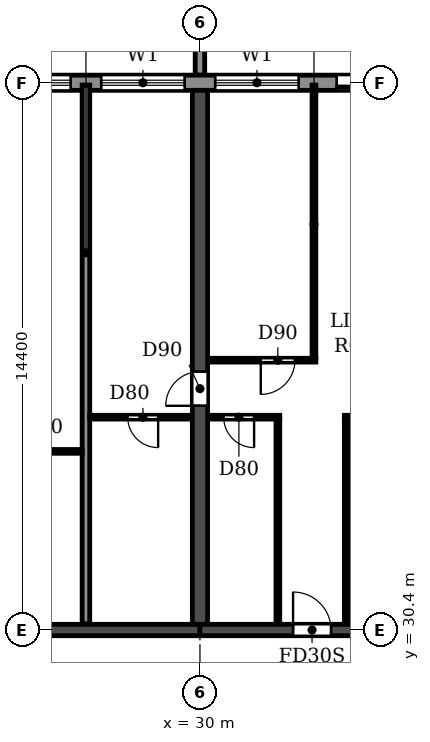
"""IFC4 building model, lengths in metres.
Left out: names, types, materials, properties, quantities, classifications, styles, units other than length and angle.
Written with IfcOpenShell. Run it as: python <this file> out.ifc"""

import sys

from ifc_helpers import new_model, si_unit, direction, frame, frame_2d, origin, place, context, subcontext, project, spatial, polyline, rectangle, outline, extrude, source, transform, mapped, element, fill, save


model = new_model("IFC4")
c1 = context("Model", 3, precision=1e-05, world=origin(), true_north=direction((0.0, 1.0)))
c2 = subcontext(c1, "Body", "Model", "MODEL_VIEW")
j1 = project(units=[si_unit("LENGTHUNIT", "METRE"), si_unit("PLANEANGLEUNIT", "RADIAN")], contexts=[c1])
p1 = place(None, origin())
s1 = spatial("IfcSite", under=j1, at=p1, CompositionType="ELEMENT")
p2 = place(p1, origin())
s2 = spatial("IfcBuilding", under=s1, at=p2, CompositionType="ELEMENT")
p3 = place(p2, frame((0.0, 0.0, 49.8)))
s3 = spatial("IfcBuildingStorey", under=s2, at=p3, CompositionType="ELEMENT", Elevation=49.8)
p4 = place(p3, frame((30.0, 30.55, 0.0), z_axis=(0.0, 0.0, 1.0), x_axis=(0.0, 1.0, 0.0)))
e1 = element("IfcWall", 1, at=p4, inside=s3, PredefinedType="SHEAR", context=c2, shape_type="SweptSolid", body=[
    extrude(rectangle(XDim=14.05, YDim=0.4, at=frame_2d((7.025, 0.0))), origin(), (0.0, 0.0, 1.0), 3.0),
])
p5 = place(p4, frame((5.75, 0.0, 0.0)))
e2 = element("IfcOpeningElement", 2, at=p5, cuts=e1, PredefinedType="OPENING", context=c2, shape_type="SweptSolid", body=[
    extrude(rectangle(XDim=0.9, YDim=2.1, at=frame_2d((0.45, 1.05))), frame((0.0, 0.21, 0.0), z_axis=(0.0, -1.0, 0.0), x_axis=(1.0, 0.0, 0.0)), (0.0, 0.0, 1.0), 0.42),
])
p6 = place(p3, frame((24.0, 30.4, 0.0), z_axis=(0.0, 0.0, 1.0), x_axis=(1.0, 0.0, 0.0)))
e3 = element("IfcWall", 3, at=p6, inside=s3, PredefinedType="SHEAR", context=c2, shape_type="SweptSolid", body=[
    extrude(rectangle(XDim=6.0, YDim=0.3, at=frame_2d((3.0, 0.0))), origin(), (0.0, 0.0, 1.0), 2.4),
])
p7 = place(p3, frame((30.0, 30.4, 0.0), z_axis=(0.0, 0.0, 1.0), x_axis=(1.0, 0.0, 0.0)))
e4 = element("IfcWall", 4, at=p7, inside=s3, PredefinedType="SHEAR", context=c2, shape_type="SweptSolid", body=[
    extrude(rectangle(XDim=6.0, YDim=0.3, at=frame_2d((3.0, 0.0))), origin(), (0.0, 0.0, 1.0), 2.4),
])
p8 = place(p7, frame((2.45, 0.0, 0.0)))
e5 = element("IfcOpeningElement", 5, at=p8, cuts=e4, PredefinedType="OPENING", context=c2, shape_type="SweptSolid", body=[
    extrude(rectangle(XDim=1.0, YDim=2.1, at=frame_2d((0.5, 1.05))), frame((0.0, 0.16, 0.0), z_axis=(0.0, -1.0, 0.0), x_axis=(1.0, 0.0, 0.0)), (0.0, 0.0, 1.0), 0.32),
])
p9 = place(p3, frame((97.317, 44.8, 0.0), z_axis=(0.0, 0.0, 1.0), x_axis=(-1.0, 0.0, 0.0)))
e6 = element("IfcWall", 6, at=p9, inside=s3, PredefinedType="STANDARD", context=c2, shape_type="SweptSolid", body=[
    extrude(rectangle(XDim=92.634, YDim=0.4, at=frame_2d((46.317, 0.0))), origin(), (0.0, 0.0, 1.0), 3.0),
])
p10 = place(p9, frame((88.917, 0.0, 0.0)))
e7 = element("IfcOpeningElement", 7, at=p10, cuts=e6, PredefinedType="OPENING", context=c2, shape_type="SweptSolid", body=[
    extrude(rectangle(XDim=1.8, YDim=2.4, at=frame_2d((0.9, 1.2))), frame((0.0, 0.21, 0.0), z_axis=(0.0, -1.0, 0.0), x_axis=(1.0, 0.0, 0.0)), (0.0, 0.0, 1.0), 0.42),
])
p11 = place(p9, frame((85.717, 0.0, 0.9)))
e8 = element("IfcOpeningElement", 8, at=p11, cuts=e6, PredefinedType="OPENING", context=c2, shape_type="SweptSolid", body=[
    extrude(rectangle(XDim=2.2, YDim=1.5, at=frame_2d((1.1, 0.75))), frame((0.0, 0.21, 0.0), z_axis=(0.0, -1.0, 0.0), x_axis=(1.0, 0.0, 0.0)), (0.0, 0.0, 1.0), 0.42),
])
p12 = place(p9, frame((82.717, 0.0, 0.9)))
e9 = element("IfcOpeningElement", 9, at=p12, cuts=e6, PredefinedType="OPENING", context=c2, shape_type="SweptSolid", body=[
    extrude(rectangle(XDim=2.2, YDim=1.5, at=frame_2d((1.1, 0.75))), frame((0.0, 0.21, 0.0), z_axis=(0.0, -1.0, 0.0), x_axis=(1.0, 0.0, 0.0)), (0.0, 0.0, 1.0), 0.42),
])
p13 = place(p9, frame((79.717, 0.0, 0.9)))
e10 = element("IfcOpeningElement", 10, at=p13, cuts=e6, PredefinedType="OPENING", context=c2, shape_type="SweptSolid", body=[
    extrude(rectangle(XDim=2.2, YDim=1.5, at=frame_2d((1.1, 0.75))), frame((0.0, 0.21, 0.0), z_axis=(0.0, -1.0, 0.0), x_axis=(1.0, 0.0, 0.0)), (0.0, 0.0, 1.0), 0.42),
])
p14 = place(p9, frame((76.717, 0.0, 0.9)))
e11 = element("IfcOpeningElement", 11, at=p14, cuts=e6, PredefinedType="OPENING", context=c2, shape_type="SweptSolid", body=[
    extrude(rectangle(XDim=2.2, YDim=1.5, at=frame_2d((1.1, 0.75))), frame((0.0, 0.21, 0.0), z_axis=(0.0, -1.0, 0.0), x_axis=(1.0, 0.0, 0.0)), (0.0, 0.0, 1.0), 0.42),
])
p15 = place(p9, frame((73.917, 0.0, 0.0)))
e12 = element("IfcOpeningElement", 12, at=p15, cuts=e6, PredefinedType="OPENING", context=c2, shape_type="SweptSolid", body=[
    extrude(rectangle(XDim=1.8, YDim=2.4, at=frame_2d((0.9, 1.2))), frame((0.0, 0.21, 0.0), z_axis=(0.0, -1.0, 0.0), x_axis=(1.0, 0.0, 0.0)), (0.0, 0.0, 1.0), 0.42),
])
p16 = place(p9, frame((70.717, 0.0, 0.9)))
e13 = element("IfcOpeningElement", 13, at=p16, cuts=e6, PredefinedType="OPENING", context=c2, shape_type="SweptSolid", body=[
    extrude(rectangle(XDim=2.2, YDim=1.5, at=frame_2d((1.1, 0.75))), frame((0.0, 0.21, 0.0), z_axis=(0.0, -1.0, 0.0), x_axis=(1.0, 0.0, 0.0)), (0.0, 0.0, 1.0), 0.42),
])
p17 = place(p9, frame((67.717, 0.0, 0.9)))
e14 = element("IfcOpeningElement", 14, at=p17, cuts=e6, PredefinedType="OPENING", context=c2, shape_type="SweptSolid", body=[
    extrude(rectangle(XDim=2.2, YDim=1.5, at=frame_2d((1.1, 0.75))), frame((0.0, 0.21, 0.0), z_axis=(0.0, -1.0, 0.0), x_axis=(1.0, 0.0, 0.0)), (0.0, 0.0, 1.0), 0.42),
])
p18 = place(p9, frame((64.717, 0.0, 0.9)))
e15 = element("IfcOpeningElement", 15, at=p18, cuts=e6, PredefinedType="OPENING", context=c2, shape_type="SweptSolid", body=[
    extrude(rectangle(XDim=2.2, YDim=1.5, at=frame_2d((1.1, 0.75))), frame((0.0, 0.21, 0.0), z_axis=(0.0, -1.0, 0.0), x_axis=(1.0, 0.0, 0.0)), (0.0, 0.0, 1.0), 0.42),
])
p19 = place(p9, frame((61.917, 0.0, 0.0)))
e16 = element("IfcOpeningElement", 16, at=p19, cuts=e6, PredefinedType="OPENING", context=c2, shape_type="SweptSolid", body=[
    extrude(rectangle(XDim=1.8, YDim=2.4, at=frame_2d((0.9, 1.2))), frame((0.0, 0.21, 0.0), z_axis=(0.0, -1.0, 0.0), x_axis=(1.0, 0.0, 0.0)), (0.0, 0.0, 1.0), 0.42),
])
p20 = place(p9, frame((58.717, 0.0, 0.9)))
e17 = element("IfcOpeningElement", 17, at=p20, cuts=e6, PredefinedType="OPENING", context=c2, shape_type="SweptSolid", body=[
    extrude(rectangle(XDim=2.2, YDim=1.5, at=frame_2d((1.1, 0.75))), frame((0.0, 0.21, 0.0), z_axis=(0.0, -1.0, 0.0), x_axis=(1.0, 0.0, 0.0)), (0.0, 0.0, 1.0), 0.42),
])
p21 = place(p9, frame((55.717, 0.0, 0.9)))
e18 = element("IfcOpeningElement", 18, at=p21, cuts=e6, PredefinedType="OPENING", context=c2, shape_type="SweptSolid", body=[
    extrude(rectangle(XDim=2.2, YDim=1.5, at=frame_2d((1.1, 0.75))), frame((0.0, 0.21, 0.0), z_axis=(0.0, -1.0, 0.0), x_axis=(1.0, 0.0, 0.0)), (0.0, 0.0, 1.0), 0.42),
])
p22 = place(p9, frame((52.717, 0.0, 0.9)))
e19 = element("IfcOpeningElement", 19, at=p22, cuts=e6, PredefinedType="OPENING", context=c2, shape_type="SweptSolid", body=[
    extrude(rectangle(XDim=2.2, YDim=1.5, at=frame_2d((1.1, 0.75))), frame((0.0, 0.21, 0.0), z_axis=(0.0, -1.0, 0.0), x_axis=(1.0, 0.0, 0.0)), (0.0, 0.0, 1.0), 0.42),
])
p23 = place(p9, frame((49.917, 0.0, 0.0)))
e20 = element("IfcOpeningElement", 20, at=p23, cuts=e6, PredefinedType="OPENING", context=c2, shape_type="SweptSolid", body=[
    extrude(rectangle(XDim=1.8, YDim=2.4, at=frame_2d((0.9, 1.2))), frame((0.0, 0.21, 0.0), z_axis=(0.0, -1.0, 0.0), x_axis=(1.0, 0.0, 0.0)), (0.0, 0.0, 1.0), 0.42),
])
p24 = place(p9, frame((46.717, 0.0, 0.9)))
e21 = element("IfcOpeningElement", 21, at=p24, cuts=e6, PredefinedType="OPENING", context=c2, shape_type="SweptSolid", body=[
    extrude(rectangle(XDim=2.2, YDim=1.5, at=frame_2d((1.1, 0.75))), frame((0.0, 0.21, 0.0), z_axis=(0.0, -1.0, 0.0), x_axis=(1.0, 0.0, 0.0)), (0.0, 0.0, 1.0), 0.42),
])
p25 = place(p9, frame((43.717, 0.0, 0.9)))
e22 = element("IfcOpeningElement", 22, at=p25, cuts=e6, PredefinedType="OPENING", context=c2, shape_type="SweptSolid", body=[
    extrude(rectangle(XDim=2.2, YDim=1.5, at=frame_2d((1.1, 0.75))), frame((0.0, 0.21, 0.0), z_axis=(0.0, -1.0, 0.0), x_axis=(1.0, 0.0, 0.0)), (0.0, 0.0, 1.0), 0.42),
])
p26 = place(p9, frame((40.717, 0.0, 0.9)))
e23 = element("IfcOpeningElement", 23, at=p26, cuts=e6, PredefinedType="OPENING", context=c2, shape_type="SweptSolid", body=[
    extrude(rectangle(XDim=2.2, YDim=1.5, at=frame_2d((1.1, 0.75))), frame((0.0, 0.21, 0.0), z_axis=(0.0, -1.0, 0.0), x_axis=(1.0, 0.0, 0.0)), (0.0, 0.0, 1.0), 0.42),
])
p27 = place(p9, frame((37.917, 0.0, 0.0)))
e24 = element("IfcOpeningElement", 24, at=p27, cuts=e6, PredefinedType="OPENING", context=c2, shape_type="SweptSolid", body=[
    extrude(rectangle(XDim=1.8, YDim=2.4, at=frame_2d((0.9, 1.2))), frame((0.0, 0.21, 0.0), z_axis=(0.0, -1.0, 0.0), x_axis=(1.0, 0.0, 0.0)), (0.0, 0.0, 1.0), 0.42),
])
p28 = place(p9, frame((34.717, 0.0, 0.9)))
e25 = element("IfcOpeningElement", 25, at=p28, cuts=e6, PredefinedType="OPENING", context=c2, shape_type="SweptSolid", body=[
    extrude(rectangle(XDim=2.2, YDim=1.5, at=frame_2d((1.1, 0.75))), frame((0.0, 0.21, 0.0), z_axis=(0.0, -1.0, 0.0), x_axis=(1.0, 0.0, 0.0)), (0.0, 0.0, 1.0), 0.42),
])
p29 = place(p9, frame((31.717, 0.0, 0.9)))
e26 = element("IfcOpeningElement", 26, at=p29, cuts=e6, PredefinedType="OPENING", context=c2, shape_type="SweptSolid", body=[
    extrude(rectangle(XDim=2.2, YDim=1.5, at=frame_2d((1.1, 0.75))), frame((0.0, 0.21, 0.0), z_axis=(0.0, -1.0, 0.0), x_axis=(1.0, 0.0, 0.0)), (0.0, 0.0, 1.0), 0.42),
])
p30 = place(p9, frame((28.717, 0.0, 0.9)))
e27 = element("IfcOpeningElement", 27, at=p30, cuts=e6, PredefinedType="OPENING", context=c2, shape_type="SweptSolid", body=[
    extrude(rectangle(XDim=2.2, YDim=1.5, at=frame_2d((1.1, 0.75))), frame((0.0, 0.21, 0.0), z_axis=(0.0, -1.0, 0.0), x_axis=(1.0, 0.0, 0.0)), (0.0, 0.0, 1.0), 0.42),
])
p31 = place(p9, frame((25.917, 0.0, 0.0)))
e28 = element("IfcOpeningElement", 28, at=p31, cuts=e6, PredefinedType="OPENING", context=c2, shape_type="SweptSolid", body=[
    extrude(rectangle(XDim=1.8, YDim=2.4, at=frame_2d((0.9, 1.2))), frame((0.0, 0.21, 0.0), z_axis=(0.0, -1.0, 0.0), x_axis=(1.0, 0.0, 0.0)), (0.0, 0.0, 1.0), 0.42),
])
p32 = place(p9, frame((22.917, 0.0, 0.0)))
e29 = element("IfcOpeningElement", 29, at=p32, cuts=e6, PredefinedType="OPENING", context=c2, shape_type="SweptSolid", body=[
    extrude(rectangle(XDim=1.8, YDim=2.4, at=frame_2d((0.9, 1.2))), frame((0.0, 0.21, 0.0), z_axis=(0.0, -1.0, 0.0), x_axis=(1.0, 0.0, 0.0)), (0.0, 0.0, 1.0), 0.42),
])
p33 = place(p9, frame((19.717, 0.0, 0.9)))
e30 = element("IfcOpeningElement", 30, at=p33, cuts=e6, PredefinedType="OPENING", context=c2, shape_type="SweptSolid", body=[
    extrude(rectangle(XDim=2.2, YDim=1.5, at=frame_2d((1.1, 0.75))), frame((0.0, 0.21, 0.0), z_axis=(0.0, -1.0, 0.0), x_axis=(1.0, 0.0, 0.0)), (0.0, 0.0, 1.0), 0.42),
])
p34 = place(p9, frame((16.717, 0.0, 0.9)))
e31 = element("IfcOpeningElement", 31, at=p34, cuts=e6, PredefinedType="OPENING", context=c2, shape_type="SweptSolid", body=[
    extrude(rectangle(XDim=2.2, YDim=1.5, at=frame_2d((1.1, 0.75))), frame((0.0, 0.21, 0.0), z_axis=(0.0, -1.0, 0.0), x_axis=(1.0, 0.0, 0.0)), (0.0, 0.0, 1.0), 0.42),
])
p35 = place(p9, frame((13.717, 0.0, 0.9)))
e32 = element("IfcOpeningElement", 32, at=p35, cuts=e6, PredefinedType="OPENING", context=c2, shape_type="SweptSolid", body=[
    extrude(rectangle(XDim=2.2, YDim=1.5, at=frame_2d((1.1, 0.75))), frame((0.0, 0.21, 0.0), z_axis=(0.0, -1.0, 0.0), x_axis=(1.0, 0.0, 0.0)), (0.0, 0.0, 1.0), 0.42),
])
p36 = place(p9, frame((10.717, 0.0, 0.9)))
e33 = element("IfcOpeningElement", 33, at=p36, cuts=e6, PredefinedType="OPENING", context=c2, shape_type="SweptSolid", body=[
    extrude(rectangle(XDim=2.2, YDim=1.5, at=frame_2d((1.1, 0.75))), frame((0.0, 0.21, 0.0), z_axis=(0.0, -1.0, 0.0), x_axis=(1.0, 0.0, 0.0)), (0.0, 0.0, 1.0), 0.42),
])
p37 = place(p9, frame((7.917, 0.0, 0.0)))
e34 = element("IfcOpeningElement", 34, at=p37, cuts=e6, PredefinedType="OPENING", context=c2, shape_type="SweptSolid", body=[
    extrude(rectangle(XDim=1.8, YDim=2.4, at=frame_2d((0.9, 1.2))), frame((0.0, 0.21, 0.0), z_axis=(0.0, -1.0, 0.0), x_axis=(1.0, 0.0, 0.0)), (0.0, 0.0, 1.0), 0.42),
])
p38 = place(p9, frame((4.717, 0.0, 0.9)))
e35 = element("IfcOpeningElement", 35, at=p38, cuts=e6, PredefinedType="OPENING", context=c2, shape_type="SweptSolid", body=[
    extrude(rectangle(XDim=2.2, YDim=1.5, at=frame_2d((1.1, 0.75))), frame((0.0, 0.21, 0.0), z_axis=(0.0, -1.0, 0.0), x_axis=(1.0, 0.0, 0.0)), (0.0, 0.0, 1.0), 0.42),
])
p39 = place(p9, frame((1.917, 0.0, 0.0)))
e36 = element("IfcOpeningElement", 36, at=p39, cuts=e6, PredefinedType="OPENING", context=c2, shape_type="SweptSolid", body=[
    extrude(rectangle(XDim=1.8, YDim=2.4, at=frame_2d((0.9, 1.2))), frame((0.0, 0.21, 0.0), z_axis=(0.0, -1.0, 0.0), x_axis=(1.0, 0.0, 0.0)), (0.0, 0.0, 1.0), 0.42),
])
m1 = source(origin(), c2, "Body", "SweptSolid", [
    extrude(outline(polyline([(0.0, 0.0), (0.25, 0.0), (0.25, 3.1), (0.0, 3.1), (0.0, 0.0)])), origin(), (0.0, 0.0, 1.0), 3.1),
])
p40 = place(p3, frame((29.875, 45.0, 0.0)))
e37 = element("IfcWall", 37, at=p40, inside=s3, PredefinedType="STANDARD", context=c2, shape_type="MappedRepresentation", body=[
    mapped(m1, transform((0.0, 0.0, 0.0))),
])
p41 = place(p3, frame((27.0, 30.56, 0.0), z_axis=(0.0, 0.0, 1.0), x_axis=(0.0, 1.0, 0.0)))
e38 = element("IfcWall", 38, at=p41, inside=s3, PredefinedType="PARTITIONING", context=c2, shape_type="SweptSolid", body=[
    extrude(rectangle(XDim=14.18, YDim=0.2, at=frame_2d((7.09, 0.0))), origin(), (0.0, 0.0, 1.0), 3.0),
])
p42 = place(p3, frame((24.21, 35.1, 0.0), z_axis=(0.0, 0.0, 1.0), x_axis=(1.0, 0.0, 0.0)))
e39 = element("IfcWall", 39, at=p42, inside=s3, PredefinedType="PARTITIONING", context=c2, shape_type="SweptSolid", body=[
    extrude(rectangle(XDim=2.69, YDim=0.1, at=frame_2d((1.345, 0.0))), origin(), (0.0, 0.0, 1.0), 3.0),
])
p43 = place(p42, frame((0.89, 0.0, 0.0)))
e40 = element("IfcOpeningElement", 40, at=p43, cuts=e39, PredefinedType="OPENING", context=c2, shape_type="SweptSolid", body=[
    extrude(rectangle(XDim=0.8, YDim=2.1, at=frame_2d((0.4, 1.05))), frame((0.0, 0.06, 0.0), z_axis=(0.0, -1.0, 0.0), x_axis=(1.0, 0.0, 0.0)), (0.0, 0.0, 1.0), 0.12),
])
p44 = place(p3, frame((27.1, 36.0, 0.0), z_axis=(0.0, 0.0, 1.0), x_axis=(1.0, 0.0, 0.0)))
e41 = element("IfcWall", 41, at=p44, inside=s3, PredefinedType="PARTITIONING", context=c2, shape_type="SweptSolid", body=[
    extrude(rectangle(XDim=2.69, YDim=0.1, at=frame_2d((1.345, 0.0))), origin(), (0.0, 0.0, 1.0), 3.0),
])
p45 = place(p44, frame((1.0, 0.0, 0.0)))
e42 = element("IfcOpeningElement", 42, at=p45, cuts=e41, PredefinedType="OPENING", context=c2, shape_type="SweptSolid", body=[
    extrude(rectangle(XDim=0.8, YDim=2.1, at=frame_2d((0.4, 1.05))), frame((0.0, 0.06, 0.0), z_axis=(0.0, -1.0, 0.0), x_axis=(1.0, 0.0, 0.0)), (0.0, 0.0, 1.0), 0.12),
])
p46 = place(p3, frame((30.21, 36.0, 0.0), z_axis=(0.0, 0.0, 1.0), x_axis=(1.0, 0.0, 0.0)))
e43 = element("IfcWall", 43, at=p46, inside=s3, PredefinedType="PARTITIONING", context=c2, shape_type="SweptSolid", body=[
    extrude(rectangle(XDim=1.89, YDim=0.1, at=frame_2d((0.945, 0.0))), origin(), (0.0, 0.0, 1.0), 3.0),
])
p47 = place(p46, frame((0.415, 0.0, 0.0)))
e44 = element("IfcOpeningElement", 44, at=p47, cuts=e43, PredefinedType="OPENING", context=c2, shape_type="SweptSolid", body=[
    extrude(rectangle(XDim=0.8, YDim=2.1, at=frame_2d((0.4, 1.05))), frame((0.0, 0.06, 0.0), z_axis=(0.0, -1.0, 0.0), x_axis=(1.0, 0.0, 0.0)), (0.0, 0.0, 1.0), 0.12),
])
p48 = place(p3, frame((33.8, 36.0, 0.0), z_axis=(0.0, 0.0, 1.0), x_axis=(1.0, 0.0, 0.0)))
e45 = element("IfcWall", 45, at=p48, inside=s3, PredefinedType="PARTITIONING", context=c2, shape_type="SweptSolid", body=[
    extrude(rectangle(XDim=1.99, YDim=0.1, at=frame_2d((0.995, 0.0))), origin(), (0.0, 0.0, 1.0), 3.0),
])
p49 = place(p48, frame((0.675, 0.0, 0.0)))
e46 = element("IfcOpeningElement", 46, at=p49, cuts=e45, PredefinedType="OPENING", context=c2, shape_type="SweptSolid", body=[
    extrude(rectangle(XDim=0.9, YDim=2.1, at=frame_2d((0.45, 1.05))), frame((0.0, 0.06, 0.0), z_axis=(0.0, -1.0, 0.0), x_axis=(1.0, 0.0, 0.0)), (0.0, 0.0, 1.0), 0.12),
])
p50 = place(p3, frame((30.21, 37.5, 0.0), z_axis=(0.0, 0.0, 1.0), x_axis=(1.0, 0.0, 0.0)))
e47 = element("IfcWall", 47, at=p50, inside=s3, PredefinedType="PARTITIONING", context=c2, shape_type="SweptSolid", body=[
    extrude(rectangle(XDim=2.84, YDim=0.1, at=frame_2d((1.42, 0.0))), origin(), (0.0, 0.0, 1.0), 3.0),
])
p51 = place(p50, frame((1.39, 0.0, 0.0)))
e48 = element("IfcOpeningElement", 48, at=p51, cuts=e47, PredefinedType="OPENING", context=c2, shape_type="SweptSolid", body=[
    extrude(rectangle(XDim=0.9, YDim=2.1, at=frame_2d((0.45, 1.05))), frame((0.0, 0.06, 0.0), z_axis=(0.0, -1.0, 0.0), x_axis=(1.0, 0.0, 0.0)), (0.0, 0.0, 1.0), 0.12),
])
p52 = place(p3, frame((32.05, 30.56, 0.0), z_axis=(0.0, 0.0, 1.0), x_axis=(0.0, 1.0, 0.0)))
e49 = element("IfcWall", 49, at=p52, inside=s3, PredefinedType="PARTITIONING", context=c2, shape_type="SweptSolid", body=[
    extrude(rectangle(XDim=5.39, YDim=0.1, at=frame_2d((2.695, 0.0))), origin(), (0.0, 0.0, 1.0), 3.0),
])
p53 = place(p3, frame((33.0, 37.55, 0.0), z_axis=(0.0, 0.0, 1.0), x_axis=(0.0, 1.0, 0.0)))
e50 = element("IfcWall", 50, at=p53, inside=s3, PredefinedType="PARTITIONING", context=c2, shape_type="SweptSolid", body=[
    extrude(rectangle(XDim=7.19, YDim=0.1, at=frame_2d((3.595, 0.0))), origin(), (0.0, 0.0, 1.0), 3.0),
])
p54 = place(p3, frame((33.85, 30.56, 0.0), z_axis=(0.0, 0.0, 1.0), x_axis=(0.0, 1.0, 0.0)))
e51 = element("IfcWall", 51, at=p54, inside=s3, PredefinedType="PARTITIONING", context=c2, shape_type="SweptSolid", body=[
    extrude(rectangle(XDim=5.39, YDim=0.1, at=frame_2d((2.695, 0.0))), origin(), (0.0, 0.0, 1.0), 3.0),
])
p55 = place(p16, origin())
e52 = element("IfcWindow", 52, at=p55, inside=s3, PartitioningType="DOUBLE_PANEL_HORIZONTAL", PredefinedType="WINDOW", context=c2, shape_type="SweptSolid", body=[
    extrude(rectangle(XDim=2.2, YDim=1.5, at=frame_2d((1.1, 0.75))), frame((0.0, 0.03, 0.0), z_axis=(0.0, -1.0, 0.0), x_axis=(1.0, 0.0, 0.0)), (0.0, 0.0, 1.0), 0.06),
])
fill(e13, e52)
p56 = place(p17, origin())
e53 = element("IfcWindow", 53, at=p56, inside=s3, PartitioningType="DOUBLE_PANEL_HORIZONTAL", PredefinedType="WINDOW", context=c2, shape_type="SweptSolid", body=[
    extrude(rectangle(XDim=2.2, YDim=1.5, at=frame_2d((1.1, 0.75))), frame((0.0, 0.03, 0.0), z_axis=(0.0, -1.0, 0.0), x_axis=(1.0, 0.0, 0.0)), (0.0, 0.0, 1.0), 0.06),
])
fill(e14, e53)
p57 = place(p18, origin())
e54 = element("IfcWindow", 54, at=p57, inside=s3, PartitioningType="DOUBLE_PANEL_HORIZONTAL", PredefinedType="WINDOW", context=c2, shape_type="SweptSolid", body=[
    extrude(rectangle(XDim=2.2, YDim=1.5, at=frame_2d((1.1, 0.75))), frame((0.0, 0.03, 0.0), z_axis=(0.0, -1.0, 0.0), x_axis=(1.0, 0.0, 0.0)), (0.0, 0.0, 1.0), 0.06),
])
fill(e15, e54)
p58 = place(p19, origin())
e55 = element("IfcDoor", 55, at=p58, inside=s3, OperationType="DOUBLE_DOOR_SLIDING", PredefinedType="DOOR", context=c2, shape_type="SweptSolid", body=[
    extrude(rectangle(XDim=1.8, YDim=2.4, at=frame_2d((0.9, 1.2))), frame((0.0, 0.025, 0.0), z_axis=(0.0, -1.0, 0.0), x_axis=(1.0, 0.0, 0.0)), (0.0, 0.0, 1.0), 0.05),
])
fill(e16, e55)
p59 = place(p45, frame((0.8, 0.0, 0.0), z_axis=(0.0, 0.0, 1.0), x_axis=(-1.0, 0.0, 0.0)))
e56 = element("IfcDoor", 56, at=p59, inside=s3, OperationType="SINGLE_SWING_LEFT", PredefinedType="DOOR", context=c2, shape_type="SweptSolid", body=[
    extrude(rectangle(XDim=0.8, YDim=2.1, at=frame_2d((0.4, 1.05))), frame((0.0, 0.025, 0.0), z_axis=(0.0, -1.0, 0.0), x_axis=(1.0, 0.0, 0.0)), (0.0, 0.0, 1.0), 0.05),
])
fill(e42, e56)
p60 = place(p5, origin())
e57 = element("IfcDoor", 57, at=p60, inside=s3, OperationType="SINGLE_SWING_LEFT", PredefinedType="DOOR", context=c2, shape_type="SweptSolid", body=[
    extrude(rectangle(XDim=0.9, YDim=2.1, at=frame_2d((0.45, 1.05))), frame((0.0, 0.025, 0.0), z_axis=(0.0, -1.0, 0.0), x_axis=(1.0, 0.0, 0.0)), (0.0, 0.0, 1.0), 0.05),
])
fill(e2, e57)
p61 = place(p47, frame((0.8, 0.0, 0.0), z_axis=(0.0, 0.0, 1.0), x_axis=(-1.0, 0.0, 0.0)))
e58 = element("IfcDoor", 58, at=p61, inside=s3, OperationType="SINGLE_SWING_LEFT", PredefinedType="DOOR", context=c2, shape_type="SweptSolid", body=[
    extrude(rectangle(XDim=0.8, YDim=2.1, at=frame_2d((0.4, 1.05))), frame((0.0, 0.025, 0.0), z_axis=(0.0, -1.0, 0.0), x_axis=(1.0, 0.0, 0.0)), (0.0, 0.0, 1.0), 0.05),
])
fill(e44, e58)
p62 = place(p51, frame((0.9, 0.0, 0.0), z_axis=(0.0, 0.0, 1.0), x_axis=(-1.0, 0.0, 0.0)))
e59 = element("IfcDoor", 59, at=p62, inside=s3, OperationType="SINGLE_SWING_RIGHT", PredefinedType="DOOR", context=c2, shape_type="SweptSolid", body=[
    extrude(rectangle(XDim=0.9, YDim=2.1, at=frame_2d((0.45, 1.05))), frame((0.0, 0.025, 0.0), z_axis=(0.0, -1.0, 0.0), x_axis=(1.0, 0.0, 0.0)), (0.0, 0.0, 1.0), 0.05),
])
fill(e48, e59)
p63 = place(p8, origin())
e60 = element("IfcDoor", 60, at=p63, inside=s3, OperationType="SINGLE_SWING_LEFT", PredefinedType="DOOR", context=c2, shape_type="SweptSolid", body=[
    extrude(rectangle(XDim=1.0, YDim=2.1, at=frame_2d((0.5, 1.05))), frame((0.0, 0.025, 0.0), z_axis=(0.0, -1.0, 0.0), x_axis=(1.0, 0.0, 0.0)), (0.0, 0.0, 1.0), 0.05),
])
fill(e5, e60)
save(model, sys.argv[1])
